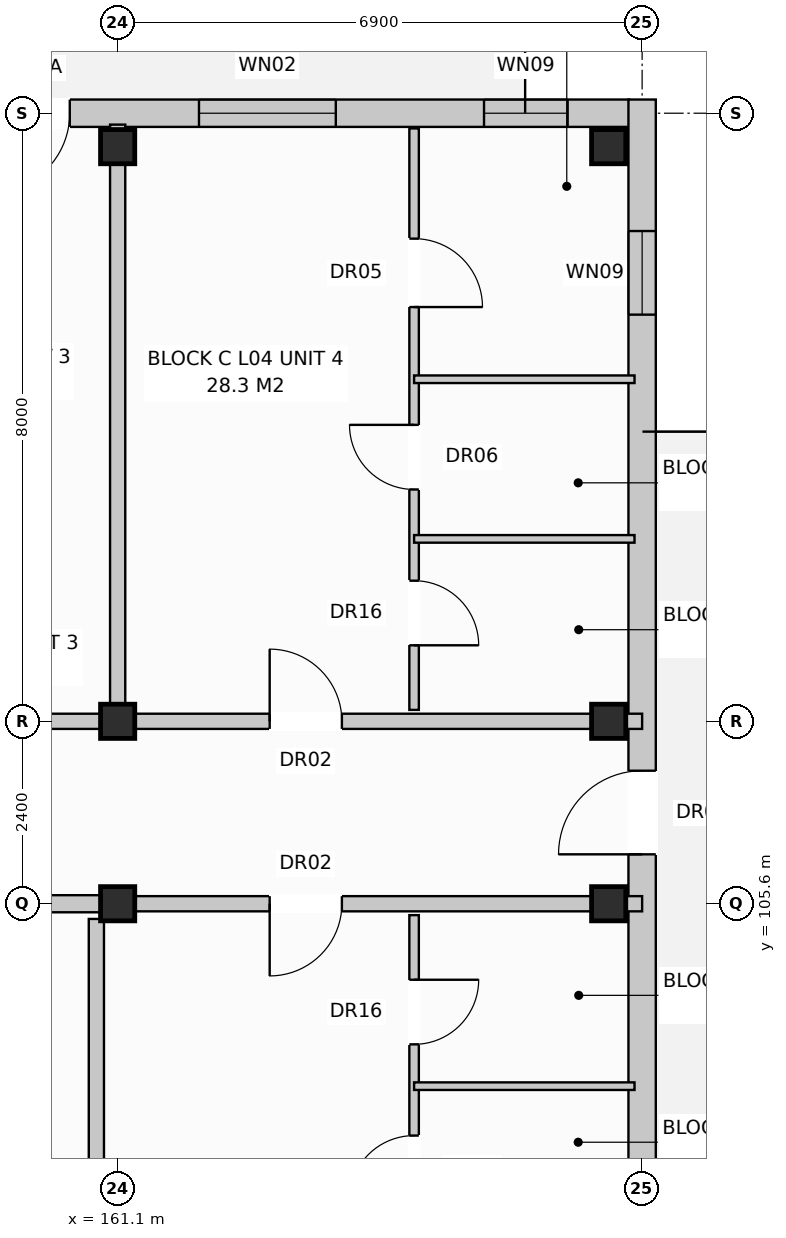
"""IFC4 building model, lengths in metres.
Left out: names, types, materials, properties, quantities, classifications, styles, units other than length and angle.
Written with IfcOpenShell. Run it as: python <this file> out.ifc"""

import sys

from ifc_helpers import new_model, si_unit, direction, frame, frame_2d, origin, origin_with_axes, origin_2d, place, context, subcontext, project, spatial, rectangle, extrude, element, fill, save


model = new_model("IFC4")
c1 = context("Model", 3, precision=1e-05, world=origin(), true_north=direction((0.0, 1.0)))
c2 = subcontext(c1, "Body", "Model", "MODEL_VIEW")
j1 = project(units=[si_unit("LENGTHUNIT", "METRE"), si_unit("PLANEANGLEUNIT", "RADIAN")], contexts=[c1])
p1 = place(None, origin())
s1 = spatial("IfcSite", under=j1, at=p1, CompositionType="ELEMENT")
p2 = place(p1, origin())
s2 = spatial("IfcBuilding", under=s1, at=p2, CompositionType="ELEMENT")
p3 = place(p2, frame((0.0, 0.0, 14.4)))
s3 = spatial("IfcBuildingStorey", under=s2, at=p3, CompositionType="ELEMENT", Elevation=14.4)
for number, where, z_axis, x_axis in (
    (1, (161.1, 105.6, 0.0), (0.0, 0.0, 1.0), (1.0, 0.0, 0.0)),
    (2, (161.1, 108.0, 0.0), (0.0, 0.0, 1.0), (1.0, 0.0, 0.0)),
    (3, (161.1, 115.56, 0.0), (0.0, 0.0, 1.0), (1.0, 0.0, 0.0)),
    (4, (167.56, 105.6, 0.0), (0.0, 0.0, 1.0), (1.0, 0.0, 0.0)),
    (5, (167.56, 108.0, 0.0), (0.0, 0.0, 1.0), (1.0, 0.0, 0.0)),
    (6, (167.56, 115.56, 0.0), (0.0, 0.0, 1.0), (1.0, 0.0, 0.0)),
):
    element("IfcColumn", number, at=place(p3, frame(where, z_axis=z_axis, x_axis=x_axis)), inside=s3, PredefinedType="COLUMN", context=c2, shape_type="SweptSolid", body=[
        extrude(rectangle(XDim=0.45, YDim=0.45, at=origin_2d()), origin(), (0.0, 0.0, 1.0), 3.2),
    ])
p4 = place(p3, frame((112.97, 116.0, 0.0), z_axis=(0.0, 0.0, 1.0), x_axis=(1.0, 0.0, 0.0)))
e7 = element("IfcWall", 7, at=p4, inside=s3, PredefinedType="STANDARD", context=c2, shape_type="SweptSolid", body=[
    extrude(rectangle(XDim=54.86, YDim=0.36, at=frame_2d((27.43, 0.0))), origin(), (0.0, 0.0, 1.0), 2.94),
])
p5 = place(p4, frame((3.779, 0.0, 0.0)))
e8 = element("IfcOpeningElement", 8, at=p5, cuts=e7, PredefinedType="OPENING", context=c2, shape_type="SweptSolid", body=[
    extrude(rectangle(XDim=1.05, YDim=2.12, at=frame_2d((0.525, 1.06))), frame((0.0, 0.192, 0.0), z_axis=(0.0, -1.0, 0.0), x_axis=(1.0, 0.0, 0.0)), (0.0, 0.0, 1.0), 0.384),
])
p6 = place(p4, frame((18.639, 0.0, 0.0)))
e9 = element("IfcOpeningElement", 9, at=p6, cuts=e7, PredefinedType="OPENING", context=c2, shape_type="SweptSolid", body=[
    extrude(rectangle(XDim=1.05, YDim=2.12, at=frame_2d((0.525, 1.06))), frame((0.0, 0.192, 0.0), z_axis=(0.0, -1.0, 0.0), x_axis=(1.0, 0.0, 0.0)), (0.0, 0.0, 1.0), 0.384),
])
p7 = place(p4, frame((29.039, 0.0, 0.0)))
e10 = element("IfcOpeningElement", 10, at=p7, cuts=e7, PredefinedType="OPENING", context=c2, shape_type="SweptSolid", body=[
    extrude(rectangle(XDim=1.05, YDim=2.12, at=frame_2d((0.525, 1.06))), frame((0.0, 0.192, 0.0), z_axis=(0.0, -1.0, 0.0), x_axis=(1.0, 0.0, 0.0)), (0.0, 0.0, 1.0), 0.384),
])
p8 = place(p4, frame((46.45, 0.0, 0.0)))
e11 = element("IfcOpeningElement", 11, at=p8, cuts=e7, PredefinedType="OPENING", context=c2, shape_type="SweptSolid", body=[
    extrude(rectangle(XDim=1.05, YDim=2.12, at=frame_2d((0.525, 1.06))), frame((0.0, 0.192, 0.0), z_axis=(0.0, -1.0, 0.0), x_axis=(1.0, 0.0, 0.0)), (0.0, 0.0, 1.0), 0.384),
])
p9 = place(p4, frame((1.525, 0.0, 0.8)))
e12 = element("IfcOpeningElement", 12, at=p9, cuts=e7, PredefinedType="OPENING", context=c2, shape_type="SweptSolid", body=[
    extrude(rectangle(XDim=1.95, YDim=1.65, at=frame_2d((0.975, 0.825))), frame((0.0, 0.192, 0.0), z_axis=(0.0, -1.0, 0.0), x_axis=(1.0, 0.0, 0.0)), (0.0, 0.0, 1.0), 0.384),
])
p10 = place(p4, frame((7.65, 0.0, 0.72)))
e13 = element("IfcOpeningElement", 13, at=p10, cuts=e7, PredefinedType="OPENING", context=c2, shape_type="SweptSolid", body=[
    extrude(rectangle(XDim=1.1, YDim=1.5, at=frame_2d((0.55, 0.75))), frame((0.0, 0.192, 0.0), z_axis=(0.0, -1.0, 0.0), x_axis=(1.0, 0.0, 0.0)), (0.0, 0.0, 1.0), 0.384),
])
p11 = place(p4, frame((10.45, 0.0, 0.8)))
e14 = element("IfcOpeningElement", 14, at=p11, cuts=e7, PredefinedType="OPENING", context=c2, shape_type="SweptSolid", body=[
    extrude(rectangle(XDim=1.9, YDim=1.85, at=frame_2d((0.95, 0.925))), frame((0.0, 0.192, 0.0), z_axis=(0.0, -1.0, 0.0), x_axis=(1.0, 0.0, 0.0)), (0.0, 0.0, 1.0), 0.384),
])
p12 = place(p4, frame((15.825, 0.0, 0.8)))
e15 = element("IfcOpeningElement", 15, at=p12, cuts=e7, PredefinedType="OPENING", context=c2, shape_type="SweptSolid", body=[
    extrude(rectangle(XDim=1.95, YDim=1.65, at=frame_2d((0.975, 0.825))), frame((0.0, 0.192, 0.0), z_axis=(0.0, -1.0, 0.0), x_axis=(1.0, 0.0, 0.0)), (0.0, 0.0, 1.0), 0.384),
])
p13 = place(p4, frame((21.6, 0.0, 0.8)))
e16 = element("IfcOpeningElement", 16, at=p13, cuts=e7, PredefinedType="OPENING", context=c2, shape_type="SweptSolid", body=[
    extrude(rectangle(XDim=1.8, YDim=1.7, at=frame_2d((0.9, 0.85))), frame((0.0, 0.192, 0.0), z_axis=(0.0, -1.0, 0.0), x_axis=(1.0, 0.0, 0.0)), (0.0, 0.0, 1.0), 0.384),
])
p14 = place(p4, frame((25.6, 0.0, 0.72)))
e17 = element("IfcOpeningElement", 17, at=p14, cuts=e7, PredefinedType="OPENING", context=c2, shape_type="SweptSolid", body=[
    extrude(rectangle(XDim=1.1, YDim=1.5, at=frame_2d((0.55, 0.75))), frame((0.0, 0.192, 0.0), z_axis=(0.0, -1.0, 0.0), x_axis=(1.0, 0.0, 0.0)), (0.0, 0.0, 1.0), 0.384),
])
p15 = place(p4, frame((31.325, 0.0, 0.8)))
e18 = element("IfcOpeningElement", 18, at=p15, cuts=e7, PredefinedType="OPENING", context=c2, shape_type="SweptSolid", body=[
    extrude(rectangle(XDim=1.95, YDim=1.65, at=frame_2d((0.975, 0.825))), frame((0.0, 0.192, 0.0), z_axis=(0.0, -1.0, 0.0), x_axis=(1.0, 0.0, 0.0)), (0.0, 0.0, 1.0), 0.384),
])
p16 = place(p4, frame((35.6, 0.0, 0.8)))
e19 = element("IfcOpeningElement", 19, at=p16, cuts=e7, PredefinedType="OPENING", context=c2, shape_type="SweptSolid", body=[
    extrude(rectangle(XDim=1.8, YDim=1.7, at=frame_2d((0.9, 0.85))), frame((0.0, 0.192, 0.0), z_axis=(0.0, -1.0, 0.0), x_axis=(1.0, 0.0, 0.0)), (0.0, 0.0, 1.0), 0.384),
])
p17 = place(p4, frame((39.25, 0.0, 0.72)))
e20 = element("IfcOpeningElement", 20, at=p17, cuts=e7, PredefinedType="OPENING", context=c2, shape_type="SweptSolid", body=[
    extrude(rectangle(XDim=1.1, YDim=1.5, at=frame_2d((0.55, 0.75))), frame((0.0, 0.192, 0.0), z_axis=(0.0, -1.0, 0.0), x_axis=(1.0, 0.0, 0.0)), (0.0, 0.0, 1.0), 0.384),
])
p18 = place(p4, frame((44.225, 0.0, 0.8)))
e21 = element("IfcOpeningElement", 21, at=p18, cuts=e7, PredefinedType="OPENING", context=c2, shape_type="SweptSolid", body=[
    extrude(rectangle(XDim=1.95, YDim=1.65, at=frame_2d((0.975, 0.825))), frame((0.0, 0.192, 0.0), z_axis=(0.0, -1.0, 0.0), x_axis=(1.0, 0.0, 0.0)), (0.0, 0.0, 1.0), 0.384),
])
p19 = place(p4, frame((49.2, 0.0, 0.8)))
e22 = element("IfcOpeningElement", 22, at=p19, cuts=e7, PredefinedType="OPENING", context=c2, shape_type="SweptSolid", body=[
    extrude(rectangle(XDim=1.8, YDim=1.7, at=frame_2d((0.9, 0.85))), frame((0.0, 0.192, 0.0), z_axis=(0.0, -1.0, 0.0), x_axis=(1.0, 0.0, 0.0)), (0.0, 0.0, 1.0), 0.384),
])
p20 = place(p4, frame((52.95, 0.0, 0.72)))
e23 = element("IfcOpeningElement", 23, at=p20, cuts=e7, PredefinedType="OPENING", context=c2, shape_type="SweptSolid", body=[
    extrude(rectangle(XDim=1.1, YDim=1.5, at=frame_2d((0.55, 0.75))), frame((0.0, 0.192, 0.0), z_axis=(0.0, -1.0, 0.0), x_axis=(1.0, 0.0, 0.0)), (0.0, 0.0, 1.0), 0.384),
])
p21 = place(p3, frame((168.0, 97.42, 0.0), z_axis=(0.0, 0.0, 1.0), x_axis=(0.0, 1.0, 0.0)))
e24 = element("IfcWall", 24, at=p21, inside=s3, PredefinedType="STANDARD", context=c2, shape_type="SweptSolid", body=[
    extrude(rectangle(XDim=18.76, YDim=0.36, at=frame_2d((9.38, 0.0))), origin(), (0.0, 0.0, 1.0), 2.94),
])
p22 = place(p21, frame((8.83, 0.0, 0.0)))
e25 = element("IfcOpeningElement", 25, at=p22, cuts=e24, PredefinedType="OPENING", context=c2, shape_type="SweptSolid", body=[
    extrude(rectangle(XDim=1.1, YDim=2.1, at=frame_2d((0.55, 1.05))), frame((0.0, 0.192, 0.0), z_axis=(0.0, -1.0, 0.0), x_axis=(1.0, 0.0, 0.0)), (0.0, 0.0, 1.0), 0.384),
])
p23 = place(p21, frame((1.73, 0.0, 0.72)))
e26 = element("IfcOpeningElement", 26, at=p23, cuts=e24, PredefinedType="OPENING", context=c2, shape_type="SweptSolid", body=[
    extrude(rectangle(XDim=1.1, YDim=1.5, at=frame_2d((0.55, 0.75))), frame((0.0, 0.192, 0.0), z_axis=(0.0, -1.0, 0.0), x_axis=(1.0, 0.0, 0.0)), (0.0, 0.0, 1.0), 0.384),
])
p24 = place(p21, frame((15.93, 0.0, 0.72)))
e27 = element("IfcOpeningElement", 27, at=p24, cuts=e24, PredefinedType="OPENING", context=c2, shape_type="SweptSolid", body=[
    extrude(rectangle(XDim=1.1, YDim=1.5, at=frame_2d((0.55, 0.75))), frame((0.0, 0.192, 0.0), z_axis=(0.0, -1.0, 0.0), x_axis=(1.0, 0.0, 0.0)), (0.0, 0.0, 1.0), 0.384),
])
p25 = place(p3, frame((160.82, 97.8, 0.0), z_axis=(0.0, 0.0, 1.0), x_axis=(0.0, 1.0, 0.0)))
e28 = element("IfcWall", 28, at=p25, inside=s3, PredefinedType="PARTITIONING", context=c2, shape_type="SweptSolid", body=[
    extrude(rectangle(XDim=7.6, YDim=0.2, at=frame_2d((3.8, 0.0))), origin(), (0.0, 0.0, 1.0), 2.38),
])
p26 = place(p3, frame((151.2, 105.6, 0.0), z_axis=(0.0, 0.0, 1.0), x_axis=(1.0, 0.0, 0.0)))
e29 = element("IfcWall", 29, at=p26, inside=s3, PredefinedType="PARTITIONING", context=c2, shape_type="SweptSolid", body=[
    extrude(rectangle(XDim=9.9, YDim=0.225, at=frame_2d((4.95, 0.0))), origin(), (0.0, 0.0, 1.0), 2.38),
])
p27 = place(p26, frame((0.475, 0.0, 0.0)))
e30 = element("IfcOpeningElement", 30, at=p27, cuts=e29, PredefinedType="OPENING", context=c2, shape_type="SweptSolid", body=[
    extrude(rectangle(XDim=1.1, YDim=2.15, at=frame_2d((0.55, 1.075))), frame((0.0, 0.125, 0.0), z_axis=(0.0, -1.0, 0.0), x_axis=(1.0, 0.0, 0.0)), (0.0, 0.0, 1.0), 0.249),
])
p28 = place(p26, frame((5.75, 0.0, 0.0)))
e31 = element("IfcOpeningElement", 31, at=p28, cuts=e29, PredefinedType="OPENING", context=c2, shape_type="SweptSolid", body=[
    extrude(rectangle(XDim=0.9, YDim=2.1, at=frame_2d((0.45, 1.05))), frame((0.0, 0.125, 0.0), z_axis=(0.0, -1.0, 0.0), x_axis=(1.0, 0.0, 0.0)), (0.0, 0.0, 1.0), 0.249),
])
p29 = place(p26, frame((7.8, 0.0, 0.0)))
e32 = element("IfcOpeningElement", 32, at=p29, cuts=e29, PredefinedType="OPENING", context=c2, shape_type="SweptSolid", body=[
    extrude(rectangle(XDim=0.95, YDim=2.15, at=frame_2d((0.475, 1.075))), frame((0.0, 0.125, 0.0), z_axis=(0.0, -1.0, 0.0), x_axis=(1.0, 0.0, 0.0)), (0.0, 0.0, 1.0), 0.249),
])
p30 = place(p3, frame((161.1, 108.15, 0.0), z_axis=(0.0, 0.0, 1.0), x_axis=(0.0, 1.0, 0.0)))
e33 = element("IfcWall", 33, at=p30, inside=s3, PredefinedType="PARTITIONING", context=c2, shape_type="SweptSolid", body=[
    extrude(rectangle(XDim=7.7, YDim=0.2, at=frame_2d((3.85, 0.0))), origin(), (0.0, 0.0, 1.0), 2.38),
])
p31 = place(p3, frame((147.3, 108.0, 0.0), z_axis=(0.0, 0.0, 1.0), x_axis=(1.0, 0.0, 0.0)))
e34 = element("IfcWall", 34, at=p31, inside=s3, PredefinedType="PARTITIONING", context=c2, shape_type="SweptSolid", body=[
    extrude(rectangle(XDim=13.8, YDim=0.2, at=frame_2d((6.9, 0.0))), origin(), (0.0, 0.0, 1.0), 2.38),
])
p32 = place(p31, frame((9.6, 0.0, 0.0)))
e35 = element("IfcOpeningElement", 35, at=p32, cuts=e34, PredefinedType="OPENING", context=c2, shape_type="SweptSolid", body=[
    extrude(rectangle(XDim=0.95, YDim=2.15, at=frame_2d((0.475, 1.075))), frame((0.0, 0.112, 0.0), z_axis=(0.0, -1.0, 0.0), x_axis=(1.0, 0.0, 0.0)), (0.0, 0.0, 1.0), 0.224),
])
p33 = place(p3, frame((161.1, 108.0, 0.0), z_axis=(0.0, 0.0, 1.0), x_axis=(1.0, 0.0, 0.0)))
e36 = element("IfcWall", 36, at=p33, inside=s3, PredefinedType="PARTITIONING", context=c2, shape_type="SweptSolid", body=[
    extrude(rectangle(XDim=6.9, YDim=0.2, at=frame_2d((3.45, 0.0))), origin(), (0.0, 0.0, 1.0), 2.38),
])
p34 = place(p33, frame((2.0, 0.0, 0.0)))
e37 = element("IfcOpeningElement", 37, at=p34, cuts=e36, PredefinedType="OPENING", context=c2, shape_type="SweptSolid", body=[
    extrude(rectangle(XDim=0.95, YDim=2.15, at=frame_2d((0.475, 1.075))), frame((0.0, 0.112, 0.0), z_axis=(0.0, -1.0, 0.0), x_axis=(1.0, 0.0, 0.0)), (0.0, 0.0, 1.0), 0.224),
])
p35 = place(p3, frame((165.0, 108.15, 0.0), z_axis=(0.0, 0.0, 1.0), x_axis=(0.0, 1.0, 0.0)))
e38 = element("IfcWall", 38, at=p35, inside=s3, PredefinedType="PARTITIONING", context=c2, shape_type="SweptSolid", body=[
    extrude(rectangle(XDim=7.65, YDim=0.125, at=frame_2d((3.825, 0.0))), origin(), (0.0, 0.0, 1.0), 2.94),
])
p36 = place(p35, frame((0.85, 0.0, 0.0)))
e39 = element("IfcOpeningElement", 39, at=p36, cuts=e38, PredefinedType="OPENING", context=c2, shape_type="SweptSolid", body=[
    extrude(rectangle(XDim=0.85, YDim=2.1, at=frame_2d((0.425, 1.05))), frame((0.0, 0.074, 0.0), z_axis=(0.0, -1.0, 0.0), x_axis=(1.0, 0.0, 0.0)), (0.0, 0.0, 1.0), 0.149),
])
p37 = place(p35, frame((2.9, 0.0, 0.0)))
e40 = element("IfcOpeningElement", 40, at=p37, cuts=e38, PredefinedType="OPENING", context=c2, shape_type="SweptSolid", body=[
    extrude(rectangle(XDim=0.85, YDim=2.05, at=frame_2d((0.425, 1.025))), frame((0.0, 0.074, 0.0), z_axis=(0.0, -1.0, 0.0), x_axis=(1.0, 0.0, 0.0)), (0.0, 0.0, 1.0), 0.149),
])
p38 = place(p35, frame((5.3, 0.0, 0.0)))
e41 = element("IfcOpeningElement", 41, at=p38, cuts=e38, PredefinedType="OPENING", context=c2, shape_type="SweptSolid", body=[
    extrude(rectangle(XDim=0.9, YDim=2.1, at=frame_2d((0.45, 1.05))), frame((0.0, 0.074, 0.0), z_axis=(0.0, -1.0, 0.0), x_axis=(1.0, 0.0, 0.0)), (0.0, 0.0, 1.0), 0.149),
])
for number, where, z_axis, x_axis in (
    (42, (165.0, 110.4, 0.0), (0.0, 0.0, 1.0), (1.0, 0.0, 0.0)),
    (43, (165.0, 112.5, 0.0), (0.0, 0.0, 1.0), (1.0, 0.0, 0.0)),
):
    element("IfcWall", number, at=place(p3, frame(where, z_axis=z_axis, x_axis=x_axis)), inside=s3, PredefinedType="PARTITIONING", context=c2, shape_type="SweptSolid", body=[
        extrude(rectangle(XDim=2.9, YDim=0.1, at=frame_2d((1.45, 0.0))), origin(), (0.0, 0.0, 1.0), 2.94),
    ])
p39 = place(p3, frame((161.1, 105.6, 0.0), z_axis=(0.0, 0.0, 1.0), x_axis=(1.0, 0.0, 0.0)))
e44 = element("IfcWall", 44, at=p39, inside=s3, PredefinedType="PARTITIONING", context=c2, shape_type="SweptSolid", body=[
    extrude(rectangle(XDim=6.9, YDim=0.2, at=frame_2d((3.45, 0.0))), origin(), (0.0, 0.0, 1.0), 2.38),
])
p40 = place(p39, frame((2.0, 0.0, 0.0)))
e45 = element("IfcOpeningElement", 45, at=p40, cuts=e44, PredefinedType="OPENING", context=c2, shape_type="SweptSolid", body=[
    extrude(rectangle(XDim=0.95, YDim=2.15, at=frame_2d((0.475, 1.075))), frame((0.0, 0.112, 0.0), z_axis=(0.0, -1.0, 0.0), x_axis=(1.0, 0.0, 0.0)), (0.0, 0.0, 1.0), 0.224),
])
p41 = place(p3, frame((165.0, 105.45, 0.0), z_axis=(0.0, 0.0, 1.0), x_axis=(0.0, -1.0, 0.0)))
e46 = element("IfcWall", 46, at=p41, inside=s3, PredefinedType="PARTITIONING", context=c2, shape_type="SweptSolid", body=[
    extrude(rectangle(XDim=7.65, YDim=0.125, at=frame_2d((3.825, 0.0))), origin(), (0.0, 0.0, 1.0), 2.94),
])
p42 = place(p41, frame((0.85, 0.0, 0.0)))
e47 = element("IfcOpeningElement", 47, at=p42, cuts=e46, PredefinedType="OPENING", context=c2, shape_type="SweptSolid", body=[
    extrude(rectangle(XDim=0.85, YDim=2.1, at=frame_2d((0.425, 1.05))), frame((0.0, 0.074, 0.0), z_axis=(0.0, -1.0, 0.0), x_axis=(1.0, 0.0, 0.0)), (0.0, 0.0, 1.0), 0.149),
])
p43 = place(p41, frame((2.9, 0.0, 0.0)))
e48 = element("IfcOpeningElement", 48, at=p43, cuts=e46, PredefinedType="OPENING", context=c2, shape_type="SweptSolid", body=[
    extrude(rectangle(XDim=0.85, YDim=2.05, at=frame_2d((0.425, 1.025))), frame((0.0, 0.074, 0.0), z_axis=(0.0, -1.0, 0.0), x_axis=(1.0, 0.0, 0.0)), (0.0, 0.0, 1.0), 0.149),
])
p44 = place(p41, frame((5.3, 0.0, 0.0)))
e49 = element("IfcOpeningElement", 49, at=p44, cuts=e46, PredefinedType="OPENING", context=c2, shape_type="SweptSolid", body=[
    extrude(rectangle(XDim=0.9, YDim=2.1, at=frame_2d((0.45, 1.05))), frame((0.0, 0.074, 0.0), z_axis=(0.0, -1.0, 0.0), x_axis=(1.0, 0.0, 0.0)), (0.0, 0.0, 1.0), 0.149),
])
p45 = place(p3, frame((165.0, 103.2, 0.0), z_axis=(0.0, 0.0, 1.0), x_axis=(1.0, 0.0, 0.0)))
e50 = element("IfcWall", 50, at=p45, inside=s3, PredefinedType="PARTITIONING", context=c2, shape_type="SweptSolid", body=[
    extrude(rectangle(XDim=2.9, YDim=0.1, at=frame_2d((1.45, 0.0))), origin(), (0.0, 0.0, 1.0), 2.94),
])
p46 = place(p8, frame((1.05, 0.0, 0.0), z_axis=(0.0, 0.0, 1.0), x_axis=(-1.0, 0.0, 0.0)))
e51 = element("IfcDoor", 51, at=p46, inside=s3, OperationType="SINGLE_SWING_LEFT", PredefinedType="DOOR", context=c2, shape_type="SweptSolid", body=[
    extrude(rectangle(XDim=1.05, YDim=2.12, at=frame_2d((0.525, 1.06))), frame((0.0, 0.025, 0.0), z_axis=(0.0, -1.0, 0.0), x_axis=(1.0, 0.0, 0.0)), (0.0, 0.0, 1.0), 0.05),
])
fill(e11, e51)
p47 = place(p19, origin_with_axes())
e52 = element("IfcWindow", 52, at=p47, inside=s3, PartitioningType="SINGLE_PANEL", PredefinedType="WINDOW", context=c2, shape_type="SweptSolid", body=[
    extrude(rectangle(XDim=1.8, YDim=1.7, at=frame_2d((0.9, 0.85))), frame((0.0, 0.03, 0.0), z_axis=(0.0, -1.0, 0.0), x_axis=(1.0, 0.0, 0.0)), (0.0, 0.0, 1.0), 0.06),
])
fill(e22, e52)
p48 = place(p20, origin_with_axes())
e53 = element("IfcWindow", 53, at=p48, inside=s3, PartitioningType="SINGLE_PANEL", PredefinedType="WINDOW", context=c2, shape_type="SweptSolid", body=[
    extrude(rectangle(XDim=1.1, YDim=1.5, at=frame_2d((0.55, 0.75))), frame((0.0, 0.03, 0.0), z_axis=(0.0, -1.0, 0.0), x_axis=(1.0, 0.0, 0.0)), (0.0, 0.0, 1.0), 0.06),
])
fill(e23, e53)
p49 = place(p22, origin_with_axes())
e54 = element("IfcDoor", 54, at=p49, inside=s3, OperationType="SINGLE_SWING_LEFT", PredefinedType="DOOR", context=c2, shape_type="SweptSolid", body=[
    extrude(rectangle(XDim=1.1, YDim=2.1, at=frame_2d((0.55, 1.05))), frame((0.0, 0.025, 0.0), z_axis=(0.0, -1.0, 0.0), x_axis=(1.0, 0.0, 0.0)), (0.0, 0.0, 1.0), 0.05),
])
fill(e25, e54)
p50 = place(p24, origin_with_axes())
e55 = element("IfcWindow", 55, at=p50, inside=s3, PartitioningType="SINGLE_PANEL", PredefinedType="WINDOW", context=c2, shape_type="SweptSolid", body=[
    extrude(rectangle(XDim=1.1, YDim=1.5, at=frame_2d((0.55, 0.75))), frame((0.0, 0.03, 0.0), z_axis=(0.0, -1.0, 0.0), x_axis=(1.0, 0.0, 0.0)), (0.0, 0.0, 1.0), 0.06),
])
fill(e27, e55)
p51 = place(p34, origin_with_axes())
e56 = element("IfcDoor", 56, at=p51, inside=s3, OperationType="SINGLE_SWING_LEFT", PredefinedType="DOOR", context=c2, shape_type="SweptSolid", body=[
    extrude(rectangle(XDim=0.95, YDim=2.15, at=frame_2d((0.475, 1.075))), frame((0.0, 0.025, 0.0), z_axis=(0.0, -1.0, 0.0), x_axis=(1.0, 0.0, 0.0)), (0.0, 0.0, 1.0), 0.05),
])
fill(e37, e56)
p52 = place(p36, frame((0.85, 0.0, 0.0), z_axis=(0.0, 0.0, 1.0), x_axis=(-1.0, 0.0, 0.0)))
e57 = element("IfcDoor", 57, at=p52, inside=s3, OperationType="SINGLE_SWING_LEFT", PredefinedType="DOOR", context=c2, shape_type="SweptSolid", body=[
    extrude(rectangle(XDim=0.85, YDim=2.1, at=frame_2d((0.425, 1.05))), frame((0.0, 0.025, 0.0), z_axis=(0.0, -1.0, 0.0), x_axis=(1.0, 0.0, 0.0)), (0.0, 0.0, 1.0), 0.05),
])
fill(e39, e57)
p53 = place(p37, origin_with_axes())
e58 = element("IfcDoor", 58, at=p53, inside=s3, OperationType="SINGLE_SWING_RIGHT", PredefinedType="DOOR", context=c2, shape_type="SweptSolid", body=[
    extrude(rectangle(XDim=0.85, YDim=2.05, at=frame_2d((0.425, 1.025))), frame((0.0, 0.025, 0.0), z_axis=(0.0, -1.0, 0.0), x_axis=(1.0, 0.0, 0.0)), (0.0, 0.0, 1.0), 0.05),
])
fill(e40, e58)
p54 = place(p38, frame((0.9, 0.0, 0.0), z_axis=(0.0, 0.0, 1.0), x_axis=(-1.0, 0.0, 0.0)))
e59 = element("IfcDoor", 59, at=p54, inside=s3, OperationType="SINGLE_SWING_LEFT", PredefinedType="DOOR", context=c2, shape_type="SweptSolid", body=[
    extrude(rectangle(XDim=0.9, YDim=2.1, at=frame_2d((0.45, 1.05))), frame((0.0, 0.025, 0.0), z_axis=(0.0, -1.0, 0.0), x_axis=(1.0, 0.0, 0.0)), (0.0, 0.0, 1.0), 0.05),
])
fill(e41, e59)
p55 = place(p40, frame((0.95, 0.0, 0.0), z_axis=(0.0, 0.0, 1.0), x_axis=(-1.0, 0.0, 0.0)))
e60 = element("IfcDoor", 60, at=p55, inside=s3, OperationType="SINGLE_SWING_LEFT", PredefinedType="DOOR", context=c2, shape_type="SweptSolid", body=[
    extrude(rectangle(XDim=0.95, YDim=2.15, at=frame_2d((0.475, 1.075))), frame((0.0, 0.025, 0.0), z_axis=(0.0, -1.0, 0.0), x_axis=(1.0, 0.0, 0.0)), (0.0, 0.0, 1.0), 0.05),
])
fill(e45, e60)
p56 = place(p42, origin_with_axes())
e61 = element("IfcDoor", 61, at=p56, inside=s3, OperationType="SINGLE_SWING_LEFT", PredefinedType="DOOR", context=c2, shape_type="SweptSolid", body=[
    extrude(rectangle(XDim=0.85, YDim=2.1, at=frame_2d((0.425, 1.05))), frame((0.0, 0.025, 0.0), z_axis=(0.0, -1.0, 0.0), x_axis=(1.0, 0.0, 0.0)), (0.0, 0.0, 1.0), 0.05),
])
fill(e47, e61)
p57 = place(p43, frame((0.85, 0.0, 0.0), z_axis=(0.0, 0.0, 1.0), x_axis=(-1.0, 0.0, 0.0)))
e62 = element("IfcDoor", 62, at=p57, inside=s3, OperationType="SINGLE_SWING_RIGHT", PredefinedType="DOOR", context=c2, shape_type="SweptSolid", body=[
    extrude(rectangle(XDim=0.85, YDim=2.05, at=frame_2d((0.425, 1.025))), frame((0.0, 0.025, 0.0), z_axis=(0.0, -1.0, 0.0), x_axis=(1.0, 0.0, 0.0)), (0.0, 0.0, 1.0), 0.05),
])
fill(e48, e62)
save(model, sys.argv[1])
